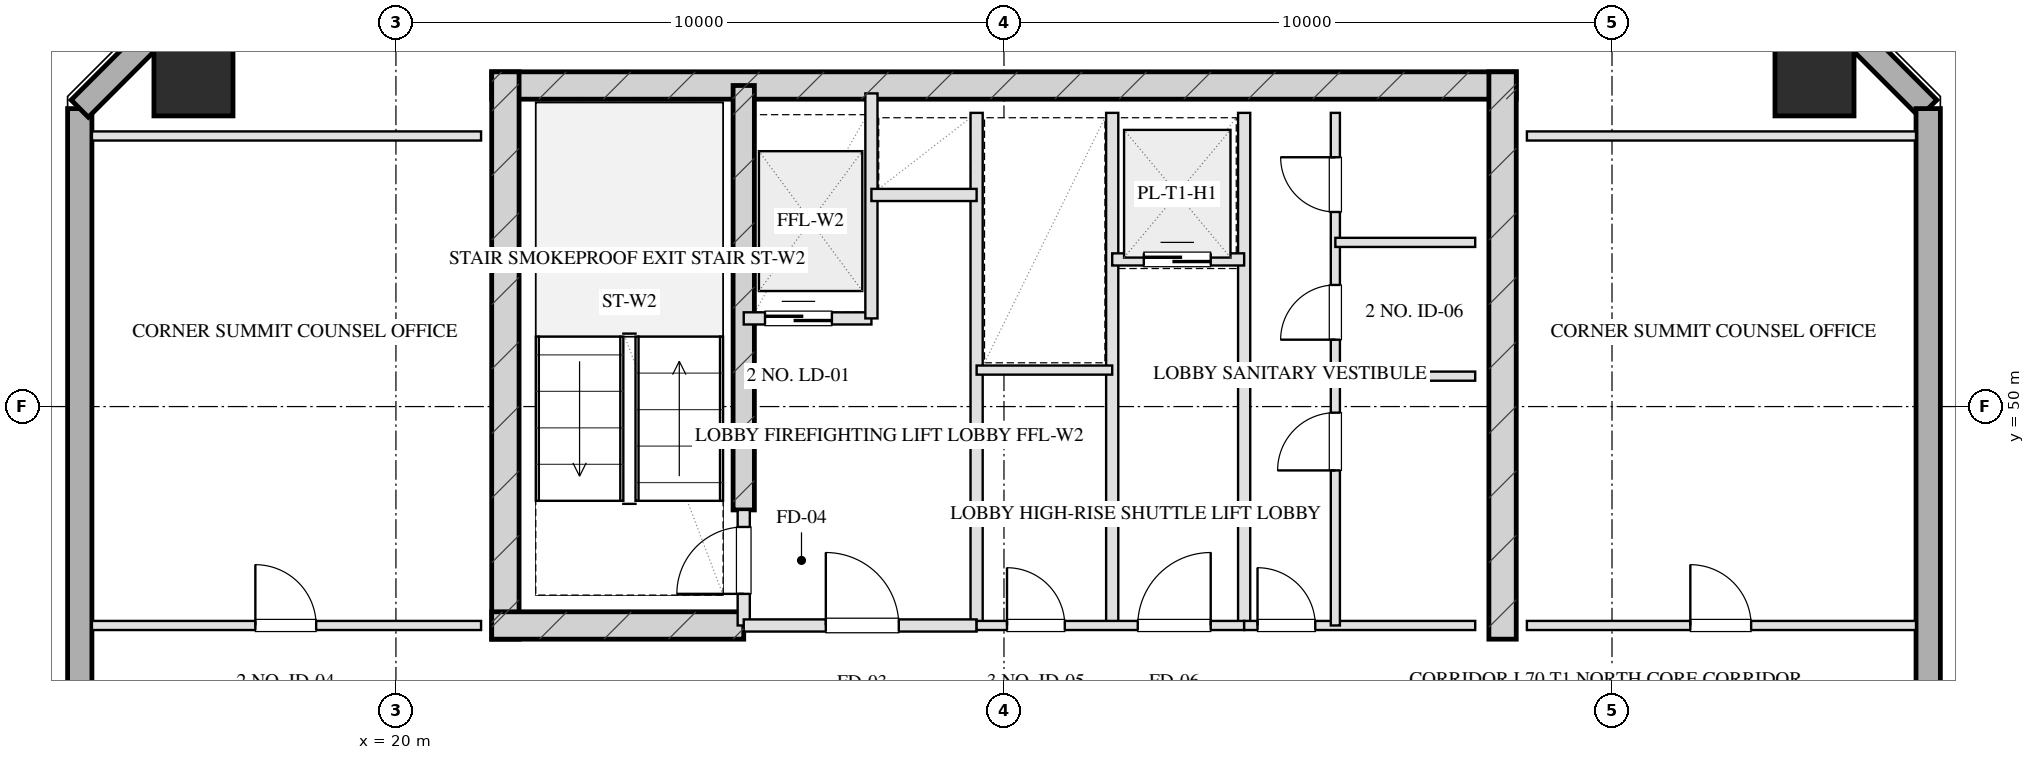
"""IFC4 building model, lengths in metres.
Left out: names, types, materials, properties, quantities, classifications, styles, units other than length and angle.
Written with IfcOpenShell. Run it as: python <this file> out.ifc"""

import sys

from ifc_helpers import new_model, si_unit, direction, frame, frame_2d, origin, origin_2d, place, context, subcontext, project, spatial, rectangle, hollow_rectangle, extrude, element, fill, save


model = new_model("IFC4")
c1 = context("Model", 3, precision=1e-05, world=origin(), true_north=direction((0.0, 1.0)))
c2 = subcontext(c1, "Body", "Model", "MODEL_VIEW")
j1 = project(units=[si_unit("LENGTHUNIT", "METRE"), si_unit("PLANEANGLEUNIT", "RADIAN")], contexts=[c1])
p1 = place(None, origin())
s1 = spatial("IfcSite", under=j1, at=p1, CompositionType="ELEMENT")
p2 = place(p1, origin())
s2 = spatial("IfcBuilding", under=s1, at=p2, CompositionType="ELEMENT")
p3 = place(p2, frame((0.0, 0.0, 256.8)))
s3 = spatial("IfcBuildingStorey", under=s2, at=p3, CompositionType="ELEMENT", Elevation=256.8)
p4 = place(p3, frame((21.575, 55.28, 0.0), z_axis=(0.0, 0.0, 1.0), x_axis=(1.0, 0.0, 0.0)))
e1 = element("IfcWall", 1, at=p4, inside=s3, PredefinedType="SHEAR", context=c2, shape_type="SweptSolid", body=[
    extrude(rectangle(XDim=16.85, YDim=0.45, at=frame_2d((8.425, 0.0))), origin(), (0.0, 0.0, 1.0), 3.2),
])
for number, where, z_axis, x_axis in (
    (2, (21.8, 46.175, 0.0), (0.0, 0.0, 1.0), (0.0, 1.0, 0.0)),
    (3, (38.2, 46.175, 0.0), (0.0, 0.0, 1.0), (0.0, 1.0, 0.0)),
):
    element("IfcWall", number, at=place(p3, frame(where, z_axis=z_axis, x_axis=x_axis)), inside=s3, PredefinedType="SHEAR", context=c2, shape_type="SweptSolid", body=[
        extrude(rectangle(XDim=9.33, YDim=0.45, at=frame_2d((4.665, 0.0))), origin(), (0.0, 0.0, 1.0), 3.2),
    ])
p5 = place(p3, frame((25.72, 48.3, 0.0), z_axis=(0.0, 0.0, 1.0), x_axis=(0.0, 1.0, 0.0)))
e4 = element("IfcWall", 4, at=p5, inside=s3, PredefinedType="SHEAR", context=c2, shape_type="SweptSolid", body=[
    extrude(rectangle(XDim=6.98, YDim=0.35, at=frame_2d((3.49, 0.0))), origin(), (0.0, 0.0, 1.0), 3.2),
])
p6 = place(p3, frame((21.575, 46.4, 0.0), z_axis=(0.0, 0.0, 1.0), x_axis=(1.0, 0.0, 0.0)))
e5 = element("IfcWall", 5, at=p6, inside=s3, PredefinedType="SHEAR", context=c2, shape_type="SweptSolid", body=[
    extrude(rectangle(XDim=4.145, YDim=0.45, at=frame_2d((2.073, 0.0))), origin(), (0.0, 0.0, 1.0), 3.2),
])
for number, where, z_axis, x_axis in (
    (6, (43.33, 55.43, 0.0), (0.0, 0.0, 1.0), (1.0, 0.0, 0.0)),
    (7, (16.67, 55.43, 0.0), (0.0, 0.0, 1.0), (1.0, 0.0, 0.0)),
):
    element("IfcColumn", number, at=place(p3, frame(where, z_axis=z_axis, x_axis=x_axis)), inside=s3, PredefinedType="COLUMN", context=c2, shape_type="SweptSolid", body=[
        extrude(hollow_rectangle(XDim=1.3, YDim=1.3, WallThickness=0.045, at=origin_2d()), origin(), (0.0, 0.0, 1.0), 3.201),
    ])
p7 = place(p3, frame((14.8, 13.1, 0.0), z_axis=(0.0, 0.0, 1.0), x_axis=(0.0, 1.0, 0.0)))
e8 = element("IfcWall", 8, at=p7, inside=s3, PredefinedType="SOLIDWALL", context=c2, shape_type="SweptSolid", body=[
    extrude(rectangle(XDim=41.8, YDim=0.4, at=frame_2d((20.9, 0.0))), origin(), (0.0, 0.0, 1.0), 2.36),
])
p8 = place(p7, frame((22.525, 0.0, 0.75)))
e9 = element("IfcOpeningElement", 9, at=p8, cuts=e8, PredefinedType="OPENING", context=c2, shape_type="SweptSolid", body=[
    extrude(rectangle(XDim=1.95, YDim=1.21, at=frame_2d((0.975, 0.605))), frame((0.0, 0.21, 0.0), z_axis=(0.0, -1.0, 0.0), x_axis=(1.0, 0.0, 0.0)), (0.0, 0.0, 1.0), 0.42),
])
p9 = place(p7, frame((26.325, 0.0, 0.75)))
e10 = element("IfcOpeningElement", 10, at=p9, cuts=e8, PredefinedType="OPENING", context=c2, shape_type="SweptSolid", body=[
    extrude(rectangle(XDim=1.95, YDim=1.21, at=frame_2d((0.975, 0.605))), frame((0.0, 0.21, 0.0), z_axis=(0.0, -1.0, 0.0), x_axis=(1.0, 0.0, 0.0)), (0.0, 0.0, 1.0), 0.42),
])
p10 = place(p7, frame((14.55, 0.0, 0.0)))
e11 = element("IfcOpeningElement", 11, at=p10, cuts=e8, PredefinedType="OPENING", context=c2, shape_type="SweptSolid", body=[
    extrude(rectangle(XDim=1.1, YDim=2.15, at=frame_2d((0.55, 1.075))), frame((0.0, 0.21, 0.0), z_axis=(0.0, -1.0, 0.0), x_axis=(1.0, 0.0, 0.0)), (0.0, 0.0, 1.0), 0.42),
])
for number, where, z_axis, x_axis in (
    (12, (14.8, 54.9, 0.0), (0.0, 0.0, 1.0), (0.707, 0.707, 0.0)),
    (13, (42.8, 57.3, 0.0), (0.0, 0.0, 1.0), (0.707, -0.707, 0.0)),
):
    element("IfcWall", number, at=place(p3, frame(where, z_axis=z_axis, x_axis=x_axis)), inside=s3, PredefinedType="SOLIDWALL", context=c2, shape_type="SweptSolid", body=[
        extrude(rectangle(XDim=3.394, YDim=0.4, at=frame_2d((1.697, 0.0))), origin(), (0.0, 0.0, 1.0), 2.36),
    ])
p11 = place(p3, frame((45.2, 54.9, 0.0), z_axis=(0.0, 0.0, 1.0), x_axis=(0.0, -1.0, 0.0)))
e14 = element("IfcWall", 14, at=p11, inside=s3, PredefinedType="SOLIDWALL", context=c2, shape_type="SweptSolid", body=[
    extrude(rectangle(XDim=41.8, YDim=0.4, at=frame_2d((20.9, 0.0))), origin(), (0.0, 0.0, 1.0), 2.36),
])
p12 = place(p11, frame((17.325, 0.0, 0.75)))
e15 = element("IfcOpeningElement", 15, at=p12, cuts=e14, PredefinedType="OPENING", context=c2, shape_type="SweptSolid", body=[
    extrude(rectangle(XDim=1.95, YDim=1.21, at=frame_2d((0.975, 0.605))), frame((0.0, 0.21, 0.0), z_axis=(0.0, -1.0, 0.0), x_axis=(1.0, 0.0, 0.0)), (0.0, 0.0, 1.0), 0.42),
])
p13 = place(p11, frame((13.525, 0.0, 0.75)))
e16 = element("IfcOpeningElement", 16, at=p13, cuts=e14, PredefinedType="OPENING", context=c2, shape_type="SweptSolid", body=[
    extrude(rectangle(XDim=1.95, YDim=1.21, at=frame_2d((0.975, 0.605))), frame((0.0, 0.21, 0.0), z_axis=(0.0, -1.0, 0.0), x_axis=(1.0, 0.0, 0.0)), (0.0, 0.0, 1.0), 0.42),
])
p14 = place(p11, frame((23.45, 0.0, 0.0)))
e17 = element("IfcOpeningElement", 17, at=p14, cuts=e14, PredefinedType="OPENING", context=c2, shape_type="SweptSolid", body=[
    extrude(rectangle(XDim=1.1, YDim=2.15, at=frame_2d((0.55, 1.075))), frame((0.0, 0.21, 0.0), z_axis=(0.0, -1.0, 0.0), x_axis=(1.0, 0.0, 0.0)), (0.0, 0.0, 1.0), 0.42),
])
p15 = place(p3, frame((25.72, 46.4, 0.0), z_axis=(0.0, 0.0, 1.0), x_axis=(0.0, 1.0, 0.0)))
e18 = element("IfcWall", 18, at=p15, inside=s3, PredefinedType="PARTITIONING", context=c2, shape_type="SweptSolid", body=[
    extrude(rectangle(XDim=1.9, YDim=0.2, at=frame_2d((0.95, 0.0))), origin(), (0.0, 0.0, 1.0), 2.925),
])
p16 = place(p15, frame((0.52, 0.0, 0.0)))
e19 = element("IfcOpeningElement", 19, at=p16, cuts=e18, PredefinedType="OPENING", context=c2, shape_type="SweptSolid", body=[
    extrude(rectangle(XDim=1.1, YDim=2.05, at=frame_2d((0.55, 1.025))), frame((0.0, 0.11, 0.0), z_axis=(0.0, -1.0, 0.0), x_axis=(1.0, 0.0, 0.0)), (0.0, 0.0, 1.0), 0.22),
])
p17 = place(p3, frame((29.55, 46.4, 0.0), z_axis=(0.0, 0.0, 1.0), x_axis=(0.0, 1.0, 0.0)))
e20 = element("IfcWall", 20, at=p17, inside=s3, PredefinedType="PARTITIONING", context=c2, shape_type="SweptSolid", body=[
    extrude(rectangle(XDim=8.43, YDim=0.2, at=frame_2d((4.215, 0.0))), origin(), (0.0, 0.0, 1.0), 2.925),
])
p18 = place(p3, frame((25.72, 46.4, 0.0), z_axis=(0.0, 0.0, 1.0), x_axis=(1.0, 0.0, 0.0)))
e21 = element("IfcWall", 21, at=p18, inside=s3, PredefinedType="PARTITIONING", context=c2, shape_type="SweptSolid", body=[
    extrude(rectangle(XDim=3.83, YDim=0.2, at=frame_2d((1.915, 0.0))), origin(), (0.0, 0.0, 1.0), 2.925),
])
p19 = place(p18, frame((1.35, 0.0, 0.0)))
e22 = element("IfcOpeningElement", 22, at=p19, cuts=e21, PredefinedType="OPENING", context=c2, shape_type="SweptSolid", body=[
    extrude(rectangle(XDim=1.2, YDim=2.05, at=frame_2d((0.6, 1.025))), frame((0.0, 0.11, 0.0), z_axis=(0.0, -1.0, 0.0), x_axis=(1.0, 0.0, 0.0)), (0.0, 0.0, 1.0), 0.22),
])
p20 = place(p3, frame((25.72, 51.45, 0.0), z_axis=(0.0, 0.0, 1.0), x_axis=(1.0, 0.0, 0.0)))
e23 = element("IfcWall", 23, at=p20, inside=s3, PredefinedType="PARTITIONING", context=c2, shape_type="SweptSolid", body=[
    extrude(rectangle(XDim=2.1, YDim=0.2, at=frame_2d((1.05, 0.0))), origin(), (0.0, 0.0, 1.0), 2.925),
])
p21 = place(p20, frame((0.35, 0.0, 0.0)))
e24 = element("IfcOpeningElement", 24, at=p21, cuts=e23, PredefinedType="OPENING", context=c2, shape_type="SweptSolid", body=[
    extrude(rectangle(XDim=1.1, YDim=2.05, at=frame_2d((0.55, 1.025))), frame((0.0, 0.11, 0.0), z_axis=(0.0, -1.0, 0.0), x_axis=(1.0, 0.0, 0.0)), (0.0, 0.0, 1.0), 0.22),
])
p22 = place(p3, frame((27.82, 51.45, 0.0), z_axis=(0.0, 0.0, 1.0), x_axis=(0.0, 1.0, 0.0)))
e25 = element("IfcWall", 25, at=p22, inside=s3, PredefinedType="PARTITIONING", context=c2, shape_type="SweptSolid", body=[
    extrude(rectangle(XDim=3.7, YDim=0.2, at=frame_2d((1.85, 0.0))), origin(), (0.0, 0.0, 1.0), 2.925),
])
p23 = place(p3, frame((27.82, 53.48, 0.0), z_axis=(0.0, 0.0, 1.0), x_axis=(1.0, 0.0, 0.0)))
e26 = element("IfcWall", 26, at=p23, inside=s3, PredefinedType="PARTITIONING", context=c2, shape_type="SweptSolid", body=[
    extrude(rectangle(XDim=1.73, YDim=0.2, at=frame_2d((0.865, 0.0))), origin(), (0.0, 0.0, 1.0), 2.925),
])
for number, where, z_axis, x_axis in (
    (27, (33.95, 46.4, 0.0), (0.0, 0.0, 1.0), (0.0, 1.0, 0.0)),
    (28, (31.78, 46.4, 0.0), (0.0, 0.0, 1.0), (0.0, 1.0, 0.0)),
):
    element("IfcWall", number, at=place(p3, frame(where, z_axis=z_axis, x_axis=x_axis)), inside=s3, PredefinedType="PARTITIONING", context=c2, shape_type="SweptSolid", body=[
        extrude(rectangle(XDim=8.43, YDim=0.2, at=frame_2d((4.215, 0.0))), origin(), (0.0, 0.0, 1.0), 2.925),
    ])
p24 = place(p3, frame((29.55, 46.4, 0.0), z_axis=(0.0, 0.0, 1.0), x_axis=(1.0, 0.0, 0.0)))
e29 = element("IfcWall", 29, at=p24, inside=s3, PredefinedType="PARTITIONING", context=c2, shape_type="SweptSolid", body=[
    extrude(rectangle(XDim=4.4, YDim=0.15, at=frame_2d((2.2, 0.0))), origin(), (0.0, 0.0, 1.0), 2.925),
])
p25 = place(p24, frame((0.5, 0.0, 0.0)))
e30 = element("IfcOpeningElement", 30, at=p25, cuts=e29, PredefinedType="OPENING", context=c2, shape_type="SweptSolid", body=[
    extrude(rectangle(XDim=0.95, YDim=2.05, at=frame_2d((0.475, 1.025))), frame((0.0, 0.085, 0.0), z_axis=(0.0, -1.0, 0.0), x_axis=(1.0, 0.0, 0.0)), (0.0, 0.0, 1.0), 0.17),
])
p26 = place(p24, frame((2.65, 0.0, 0.0)))
e31 = element("IfcOpeningElement", 31, at=p26, cuts=e29, PredefinedType="OPENING", context=c2, shape_type="SweptSolid", body=[
    extrude(rectangle(XDim=1.2, YDim=2.05, at=frame_2d((0.6, 1.025))), frame((0.0, 0.085, 0.0), z_axis=(0.0, -1.0, 0.0), x_axis=(1.0, 0.0, 0.0)), (0.0, 0.0, 1.0), 0.17),
])
p27 = place(p3, frame((29.55, 50.6, 0.0), z_axis=(0.0, 0.0, 1.0), x_axis=(1.0, 0.0, 0.0)))
e32 = element("IfcWall", 32, at=p27, inside=s3, PredefinedType="PARTITIONING", context=c2, shape_type="SweptSolid", body=[
    extrude(rectangle(XDim=2.23, YDim=0.15, at=frame_2d((1.115, 0.0))), origin(), (0.0, 0.0, 1.0), 2.925),
])
p28 = place(p3, frame((31.78, 52.42, 0.0), z_axis=(0.0, 0.0, 1.0), x_axis=(1.0, 0.0, 0.0)))
e33 = element("IfcWall", 33, at=p28, inside=s3, PredefinedType="PARTITIONING", context=c2, shape_type="SweptSolid", body=[
    extrude(rectangle(XDim=2.17, YDim=0.2, at=frame_2d((1.085, 0.0))), origin(), (0.0, 0.0, 1.0), 2.925),
])
p29 = place(p28, frame((0.52, 0.0, 0.0)))
e34 = element("IfcOpeningElement", 34, at=p29, cuts=e33, PredefinedType="OPENING", context=c2, shape_type="SweptSolid", body=[
    extrude(rectangle(XDim=1.1, YDim=2.05, at=frame_2d((0.55, 1.025))), frame((0.0, 0.11, 0.0), z_axis=(0.0, -1.0, 0.0), x_axis=(1.0, 0.0, 0.0)), (0.0, 0.0, 1.0), 0.22),
])
p30 = place(p3, frame((33.95, 46.4, 0.0), z_axis=(0.0, 0.0, 1.0), x_axis=(1.0, 0.0, 0.0)))
e35 = element("IfcWall", 35, at=p30, inside=s3, PredefinedType="PARTITIONING", context=c2, shape_type="SweptSolid", body=[
    extrude(rectangle(XDim=3.8, YDim=0.15, at=frame_2d((1.9, 0.0))), origin(), (0.0, 0.0, 1.0), 2.925),
])
p31 = place(p30, frame((0.22, 0.0, 0.0)))
e36 = element("IfcOpeningElement", 36, at=p31, cuts=e35, PredefinedType="OPENING", context=c2, shape_type="SweptSolid", body=[
    extrude(rectangle(XDim=0.95, YDim=2.05, at=frame_2d((0.475, 1.025))), frame((0.0, 0.085, 0.0), z_axis=(0.0, -1.0, 0.0), x_axis=(1.0, 0.0, 0.0)), (0.0, 0.0, 1.0), 0.17),
])
p32 = place(p3, frame((35.45, 46.4, 0.0), z_axis=(0.0, 0.0, 1.0), x_axis=(0.0, 1.0, 0.0)))
e37 = element("IfcWall", 37, at=p32, inside=s3, PredefinedType="PARTITIONING", context=c2, shape_type="SweptSolid", body=[
    extrude(rectangle(XDim=8.43, YDim=0.15, at=frame_2d((4.215, 0.0))), origin(), (0.0, 0.0, 1.0), 2.515),
])
p33 = place(p32, frame((2.55, 0.0, 0.0)))
e38 = element("IfcOpeningElement", 38, at=p33, cuts=e37, PredefinedType="OPENING", context=c2, shape_type="SweptSolid", body=[
    extrude(rectangle(XDim=0.95, YDim=2.05, at=frame_2d((0.475, 1.025))), frame((0.0, 0.085, 0.0), z_axis=(0.0, -1.0, 0.0), x_axis=(1.0, 0.0, 0.0)), (0.0, 0.0, 1.0), 0.17),
])
p34 = place(p32, frame((4.7, 0.0, 0.0)))
e39 = element("IfcOpeningElement", 39, at=p34, cuts=e37, PredefinedType="OPENING", context=c2, shape_type="SweptSolid", body=[
    extrude(rectangle(XDim=0.9, YDim=2.05, at=frame_2d((0.45, 1.025))), frame((0.0, 0.085, 0.0), z_axis=(0.0, -1.0, 0.0), x_axis=(1.0, 0.0, 0.0)), (0.0, 0.0, 1.0), 0.17),
])
p35 = place(p32, frame((6.8, 0.0, 0.0)))
e40 = element("IfcOpeningElement", 40, at=p35, cuts=e37, PredefinedType="OPENING", context=c2, shape_type="SweptSolid", body=[
    extrude(rectangle(XDim=0.9, YDim=2.05, at=frame_2d((0.45, 1.025))), frame((0.0, 0.085, 0.0), z_axis=(0.0, -1.0, 0.0), x_axis=(1.0, 0.0, 0.0)), (0.0, 0.0, 1.0), 0.17),
])
for number, where, z_axis, x_axis in (
    (41, (35.45, 50.5, 0.0), (0.0, 0.0, 1.0), (1.0, 0.0, 0.0)),
    (42, (35.45, 52.7, 0.0), (0.0, 0.0, 1.0), (1.0, 0.0, 0.0)),
):
    element("IfcWall", number, at=place(p3, frame(where, z_axis=z_axis, x_axis=x_axis)), inside=s3, PredefinedType="PARTITIONING", context=c2, shape_type="SweptSolid", body=[
        extrude(rectangle(XDim=2.3, YDim=0.15, at=frame_2d((1.15, 0.0))), origin(), (0.0, 0.0, 1.0), 2.925),
    ])
p36 = place(p3, frame((15.0, 54.45, 0.0), z_axis=(0.0, 0.0, 1.0), x_axis=(1.0, 0.0, 0.0)))
e43 = element("IfcWall", 43, at=p36, inside=s3, PredefinedType="PARTITIONING", context=c2, shape_type="SweptSolid", body=[
    extrude(rectangle(XDim=6.4, YDim=0.15, at=frame_2d((3.2, 0.0))), origin(), (0.0, 0.0, 1.0), 2.925),
])
p37 = place(p3, frame((15.0, 46.4, 0.0), z_axis=(0.0, 0.0, 1.0), x_axis=(1.0, 0.0, 0.0)))
e44 = element("IfcWall", 44, at=p37, inside=s3, PredefinedType="PARTITIONING", context=c2, shape_type="SweptSolid", body=[
    extrude(rectangle(XDim=6.4, YDim=0.15, at=frame_2d((3.2, 0.0))), origin(), (0.0, 0.0, 1.0), 2.925),
])
p38 = place(p37, frame((2.688, 0.0, 0.0)))
e45 = element("IfcOpeningElement", 45, at=p38, cuts=e44, PredefinedType="OPENING", context=c2, shape_type="SweptSolid", body=[
    extrude(rectangle(XDim=1.0, YDim=2.05, at=frame_2d((0.5, 1.025))), frame((0.0, 0.085, 0.0), z_axis=(0.0, -1.0, 0.0), x_axis=(1.0, 0.0, 0.0)), (0.0, 0.0, 1.0), 0.17),
])
p39 = place(p3, frame((38.6, 54.45, 0.0), z_axis=(0.0, 0.0, 1.0), x_axis=(1.0, 0.0, 0.0)))
e46 = element("IfcWall", 46, at=p39, inside=s3, PredefinedType="PARTITIONING", context=c2, shape_type="SweptSolid", body=[
    extrude(rectangle(XDim=6.4, YDim=0.15, at=frame_2d((3.2, 0.0))), origin(), (0.0, 0.0, 1.0), 2.925),
])
p40 = place(p3, frame((38.6, 46.4, 0.0), z_axis=(0.0, 0.0, 1.0), x_axis=(1.0, 0.0, 0.0)))
e47 = element("IfcWall", 47, at=p40, inside=s3, PredefinedType="PARTITIONING", context=c2, shape_type="SweptSolid", body=[
    extrude(rectangle(XDim=6.4, YDim=0.15, at=frame_2d((3.2, 0.0))), origin(), (0.0, 0.0, 1.0), 2.925),
])
p41 = place(p40, frame((2.688, 0.0, 0.0)))
e48 = element("IfcOpeningElement", 48, at=p41, cuts=e47, PredefinedType="OPENING", context=c2, shape_type="SweptSolid", body=[
    extrude(rectangle(XDim=1.0, YDim=2.05, at=frame_2d((0.5, 1.025))), frame((0.0, 0.085, 0.0), z_axis=(0.0, -1.0, 0.0), x_axis=(1.0, 0.0, 0.0)), (0.0, 0.0, 1.0), 0.17),
])
p42 = place(p16, origin())
e49 = element("IfcDoor", 49, at=p42, inside=s3, OperationType="SINGLE_SWING_LEFT", PredefinedType="DOOR", context=c2, shape_type="SweptSolid", body=[
    extrude(rectangle(XDim=1.1, YDim=2.05, at=frame_2d((0.55, 1.025))), frame((0.0, 0.025, 0.0), z_axis=(0.0, -1.0, 0.0), x_axis=(1.0, 0.0, 0.0)), (0.0, 0.0, 1.0), 0.05),
])
fill(e19, e49)
p43 = place(p19, origin())
e50 = element("IfcDoor", 50, at=p43, inside=s3, OperationType="SINGLE_SWING_LEFT", PredefinedType="DOOR", context=c2, shape_type="SweptSolid", body=[
    extrude(rectangle(XDim=1.2, YDim=2.05, at=frame_2d((0.6, 1.025))), frame((0.0, 0.025, 0.0), z_axis=(0.0, -1.0, 0.0), x_axis=(1.0, 0.0, 0.0)), (0.0, 0.0, 1.0), 0.05),
])
fill(e22, e50)
p44 = place(p21, origin())
e51 = element("IfcDoor", 51, at=p44, inside=s3, OperationType="DOUBLE_DOOR_SLIDING", PredefinedType="DOOR", context=c2, shape_type="SweptSolid", body=[
    extrude(rectangle(XDim=1.1, YDim=2.05, at=frame_2d((0.55, 1.025))), frame((0.0, 0.025, 0.0), z_axis=(0.0, -1.0, 0.0), x_axis=(1.0, 0.0, 0.0)), (0.0, 0.0, 1.0), 0.05),
])
fill(e24, e51)
p45 = place(p25, origin())
e52 = element("IfcDoor", 52, at=p45, inside=s3, OperationType="SINGLE_SWING_LEFT", PredefinedType="DOOR", context=c2, shape_type="SweptSolid", body=[
    extrude(rectangle(XDim=0.95, YDim=2.05, at=frame_2d((0.475, 1.025))), frame((0.0, 0.025, 0.0), z_axis=(0.0, -1.0, 0.0), x_axis=(1.0, 0.0, 0.0)), (0.0, 0.0, 1.0), 0.05),
])
fill(e30, e52)
p46 = place(p26, origin())
e53 = element("IfcDoor", 53, at=p46, inside=s3, OperationType="SINGLE_SWING_RIGHT", PredefinedType="DOOR", context=c2, shape_type="SweptSolid", body=[
    extrude(rectangle(XDim=1.2, YDim=2.05, at=frame_2d((0.6, 1.025))), frame((0.0, 0.025, 0.0), z_axis=(0.0, -1.0, 0.0), x_axis=(1.0, 0.0, 0.0)), (0.0, 0.0, 1.0), 0.05),
])
fill(e31, e53)
p47 = place(p29, origin())
e54 = element("IfcDoor", 54, at=p47, inside=s3, OperationType="DOUBLE_DOOR_SLIDING", PredefinedType="DOOR", context=c2, shape_type="SweptSolid", body=[
    extrude(rectangle(XDim=1.1, YDim=2.05, at=frame_2d((0.55, 1.025))), frame((0.0, 0.025, 0.0), z_axis=(0.0, -1.0, 0.0), x_axis=(1.0, 0.0, 0.0)), (0.0, 0.0, 1.0), 0.05),
])
fill(e34, e54)
p48 = place(p31, origin())
e55 = element("IfcDoor", 55, at=p48, inside=s3, OperationType="SINGLE_SWING_LEFT", PredefinedType="DOOR", context=c2, shape_type="SweptSolid", body=[
    extrude(rectangle(XDim=0.95, YDim=2.05, at=frame_2d((0.475, 1.025))), frame((0.0, 0.025, 0.0), z_axis=(0.0, -1.0, 0.0), x_axis=(1.0, 0.0, 0.0)), (0.0, 0.0, 1.0), 0.05),
])
fill(e36, e55)
p49 = place(p33, origin())
e56 = element("IfcDoor", 56, at=p49, inside=s3, OperationType="SINGLE_SWING_LEFT", PredefinedType="DOOR", context=c2, shape_type="SweptSolid", body=[
    extrude(rectangle(XDim=0.95, YDim=2.05, at=frame_2d((0.475, 1.025))), frame((0.0, 0.025, 0.0), z_axis=(0.0, -1.0, 0.0), x_axis=(1.0, 0.0, 0.0)), (0.0, 0.0, 1.0), 0.05),
])
fill(e38, e56)
p50 = place(p34, origin())
e57 = element("IfcDoor", 57, at=p50, inside=s3, OperationType="SINGLE_SWING_LEFT", PredefinedType="DOOR", context=c2, shape_type="SweptSolid", body=[
    extrude(rectangle(XDim=0.9, YDim=2.05, at=frame_2d((0.45, 1.025))), frame((0.0, 0.025, 0.0), z_axis=(0.0, -1.0, 0.0), x_axis=(1.0, 0.0, 0.0)), (0.0, 0.0, 1.0), 0.05),
])
fill(e39, e57)
p51 = place(p35, origin())
e58 = element("IfcDoor", 58, at=p51, inside=s3, OperationType="SINGLE_SWING_RIGHT", PredefinedType="DOOR", context=c2, shape_type="SweptSolid", body=[
    extrude(rectangle(XDim=0.9, YDim=2.05, at=frame_2d((0.45, 1.025))), frame((0.0, 0.025, 0.0), z_axis=(0.0, -1.0, 0.0), x_axis=(1.0, 0.0, 0.0)), (0.0, 0.0, 1.0), 0.05),
])
fill(e40, e58)
p52 = place(p38, origin())
e59 = element("IfcDoor", 59, at=p52, inside=s3, OperationType="SINGLE_SWING_LEFT", PredefinedType="DOOR", context=c2, shape_type="SweptSolid", body=[
    extrude(rectangle(XDim=1.0, YDim=2.05, at=frame_2d((0.5, 1.025))), frame((0.0, 0.025, 0.0), z_axis=(0.0, -1.0, 0.0), x_axis=(1.0, 0.0, 0.0)), (0.0, 0.0, 1.0), 0.05),
])
fill(e45, e59)
p53 = place(p41, origin())
e60 = element("IfcDoor", 60, at=p53, inside=s3, OperationType="SINGLE_SWING_LEFT", PredefinedType="DOOR", context=c2, shape_type="SweptSolid", body=[
    extrude(rectangle(XDim=1.0, YDim=2.05, at=frame_2d((0.5, 1.025))), frame((0.0, 0.025, 0.0), z_axis=(0.0, -1.0, 0.0), x_axis=(1.0, 0.0, 0.0)), (0.0, 0.0, 1.0), 0.05),
])
fill(e48, e60)
save(model, sys.argv[1])
